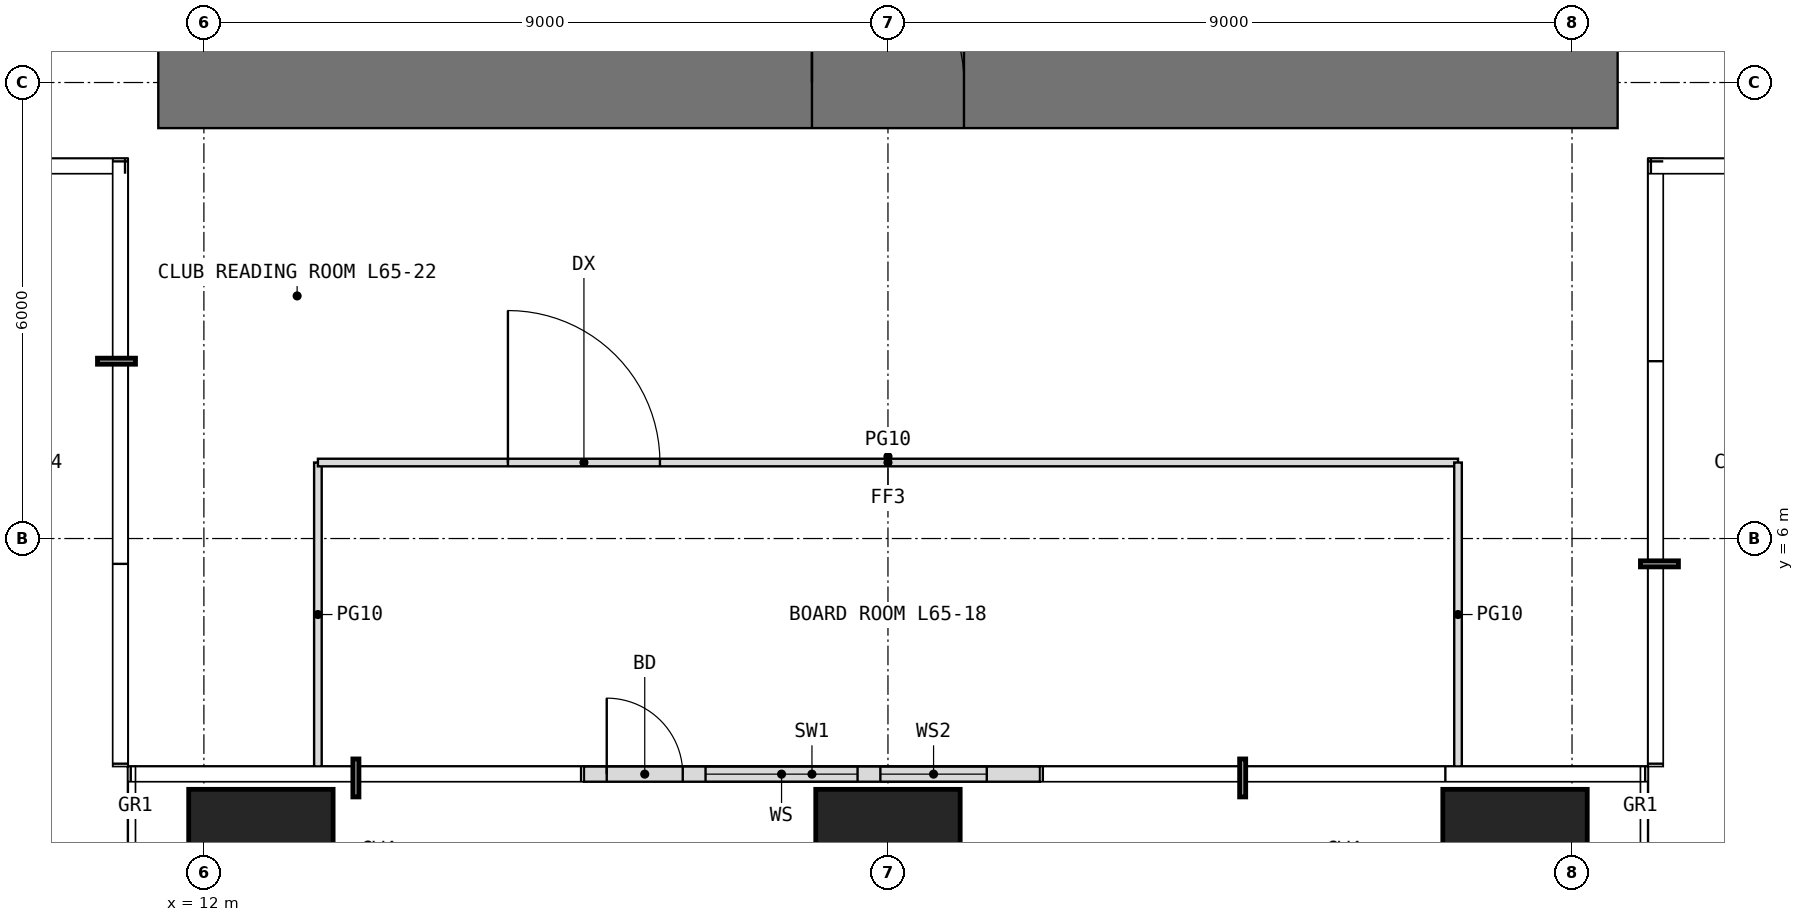
"""IFC4 building model, lengths in metres.
Left out: names, types, materials, properties, quantities, classifications, styles, units other than length and angle.
Written with IfcOpenShell. Run it as: python <this file> out.ifc"""

import sys

from ifc_helpers import new_model, si_unit, direction, frame, frame_2d, origin, origin_2d, place, context, subcontext, project, spatial, rectangle, extrude, element, fill, save


model = new_model("IFC4")
c1 = context("Model", 3, precision=1e-05, world=origin(), true_north=direction((0.0, 1.0)))
c2 = subcontext(c1, "Body", "Model", "MODEL_VIEW")
j1 = project(units=[si_unit("LENGTHUNIT", "METRE"), si_unit("PLANEANGLEUNIT", "RADIAN")], contexts=[c1])
p1 = place(None, origin())
s1 = spatial("IfcSite", under=j1, at=p1, CompositionType="ELEMENT")
p2 = place(p1, origin())
s2 = spatial("IfcBuilding", under=s1, at=p2, CompositionType="ELEMENT")
p3 = place(p2, frame((0.0, 0.0, 273.4)))
s3 = spatial("IfcBuildingStorey", under=s2, at=p3, CompositionType="ELEMENT", Elevation=273.4)
for number, where, z_axis, x_axis in (
    (1, (12.75, 1.75, 0.0), (0.0, 0.0, 1.0), (1.0, 0.0, 0.0)),
    (2, (21.0, 1.75, 0.0), (0.0, 0.0, 1.0), (1.0, 0.0, 0.0)),
    (3, (29.25, 1.75, 0.0), (0.0, 0.0, 1.0), (1.0, 0.0, 0.0)),
):
    element("IfcColumn", number, at=place(p3, frame(where, z_axis=z_axis, x_axis=x_axis)), inside=s3, PredefinedType="COLUMN", context=c2, shape_type="SweptSolid", body=[
        extrude(rectangle(XDim=1.9, YDim=1.9, at=origin_2d()), origin(), (0.0, 0.0, 1.0), 4.5),
    ])
p4 = place(p3, frame((17.0, 2.9, 0.0), z_axis=(0.0, 0.0, 1.0), x_axis=(1.0, 0.0, 0.0)))
e4 = element("IfcWall", 4, at=p4, inside=s3, PredefinedType="USERDEFINED", context=c2, shape_type="SweptSolid", body=[
    extrude(rectangle(XDim=6.0, YDim=0.2, at=frame_2d((3.0, 0.0))), origin(), (0.0, 0.0, 1.0), 4.2),
])
p5 = place(p4, frame((0.3, 0.0, 0.0)))
e5 = element("IfcOpeningElement", 5, at=p5, cuts=e4, PredefinedType="OPENING", context=c2, shape_type="SweptSolid", body=[
    extrude(rectangle(XDim=1.0, YDim=2.4, at=frame_2d((0.5, 1.2))), frame((0.0, 0.11, 0.0), z_axis=(0.0, -1.0, 0.0), x_axis=(1.0, 0.0, 0.0)), (0.0, 0.0, 1.0), 0.22),
])
p6 = place(p4, frame((1.6, 0.0, 0.3)))
e6 = element("IfcOpeningElement", 6, at=p6, cuts=e4, PredefinedType="OPENING", context=c2, shape_type="SweptSolid", body=[
    extrude(rectangle(XDim=2.0, YDim=2.7, at=frame_2d((1.0, 1.35))), frame((0.0, 0.11, 0.0), z_axis=(0.0, -1.0, 0.0), x_axis=(1.0, 0.0, 0.0)), (0.0, 0.0, 1.0), 0.22),
])
p7 = place(p4, frame((3.9, 0.0, 0.3)))
e7 = element("IfcOpeningElement", 7, at=p7, cuts=e4, PredefinedType="OPENING", context=c2, shape_type="SweptSolid", body=[
    extrude(rectangle(XDim=1.4, YDim=2.7, at=frame_2d((0.7, 1.35))), frame((0.0, 0.11, 0.0), z_axis=(0.0, -1.0, 0.0), x_axis=(1.0, 0.0, 0.0)), (0.0, 0.0, 1.0), 0.22),
])
p8 = place(p3, frame((11.4, 12.0, -0.05), z_axis=(0.0, 0.0, 1.0), x_axis=(1.0, 0.0, 0.0)))
e8 = element("IfcWall", 8, at=p8, inside=s3, PredefinedType="SHEAR", context=c2, shape_type="SweptSolid", body=[
    extrude(rectangle(XDim=19.2, YDim=1.2, at=frame_2d((9.6, 0.0))), origin(), (0.0, 0.0, 1.0), 4.45),
])
p9 = place(p8, frame((8.6, 0.0, 0.05)))
e9 = element("IfcOpeningElement", 9, at=p9, cuts=e8, PredefinedType="OPENING", context=c2, shape_type="SweptSolid", body=[
    extrude(rectangle(XDim=2.0, YDim=2.2, at=frame_2d((1.0, 1.1))), frame((0.0, 0.61, 0.0), z_axis=(0.0, -1.0, 0.0), x_axis=(1.0, 0.0, 0.0)), (0.0, 0.0, 1.0), 1.22),
])
p10 = place(p3, frame((13.5, 3.0, 0.0), z_axis=(0.0, 0.0, 1.0), x_axis=(0.0, 1.0, 0.0)))
e10 = element("IfcWall", 10, at=p10, inside=s3, PredefinedType="PARTITIONING", context=c2, shape_type="SweptSolid", body=[
    extrude(rectangle(XDim=4.0, YDim=0.1, at=frame_2d((2.0, 0.0))), origin(), (0.0, 0.0, 1.0), 4.2),
])
p11 = place(p3, frame((13.5, 7.0, 0.0), z_axis=(0.0, 0.0, 1.0), x_axis=(1.0, 0.0, 0.0)))
e11 = element("IfcWall", 11, at=p11, inside=s3, PredefinedType="PARTITIONING", context=c2, shape_type="SweptSolid", body=[
    extrude(rectangle(XDim=15.0, YDim=0.1, at=frame_2d((7.5, 0.0))), origin(), (0.0, 0.0, 1.0), 4.2),
])
p12 = place(p11, frame((2.5, 0.0, 0.0)))
e12 = element("IfcOpeningElement", 12, at=p12, cuts=e11, PredefinedType="OPENING", context=c2, shape_type="SweptSolid", body=[
    extrude(rectangle(XDim=2.0, YDim=2.4, at=frame_2d((1.0, 1.2))), frame((0.0, 0.06, 0.0), z_axis=(0.0, -1.0, 0.0), x_axis=(1.0, 0.0, 0.0)), (0.0, 0.0, 1.0), 0.12),
])
p13 = place(p3, frame((28.5, 3.0, 0.0), z_axis=(0.0, 0.0, 1.0), x_axis=(0.0, 1.0, 0.0)))
e13 = element("IfcWall", 13, at=p13, inside=s3, PredefinedType="PARTITIONING", context=c2, shape_type="SweptSolid", body=[
    extrude(rectangle(XDim=4.0, YDim=0.1, at=frame_2d((2.0, 0.0))), origin(), (0.0, 0.0, 1.0), 4.2),
])
p14 = place(p5, origin())
e14 = element("IfcDoor", 14, at=p14, inside=s3, OperationType="SINGLE_SWING_LEFT", PredefinedType="DOOR", context=c2, shape_type="SweptSolid", body=[
    extrude(rectangle(XDim=1.0, YDim=2.4, at=frame_2d((0.5, 1.2))), frame((0.0, 0.025, 0.0), z_axis=(0.0, -1.0, 0.0), x_axis=(1.0, 0.0, 0.0)), (0.0, 0.0, 1.0), 0.05),
])
fill(e5, e14)
p15 = place(p6, origin())
e15 = element("IfcWindow", 15, at=p15, inside=s3, PartitioningType="SINGLE_PANEL", PredefinedType="WINDOW", context=c2, shape_type="SweptSolid", body=[
    extrude(rectangle(XDim=2.0, YDim=2.7, at=frame_2d((1.0, 1.35))), frame((0.0, 0.03, 0.0), z_axis=(0.0, -1.0, 0.0), x_axis=(1.0, 0.0, 0.0)), (0.0, 0.0, 1.0), 0.06),
])
fill(e6, e15)
p16 = place(p7, origin())
e16 = element("IfcWindow", 16, at=p16, inside=s3, PartitioningType="SINGLE_PANEL", PredefinedType="WINDOW", context=c2, shape_type="SweptSolid", body=[
    extrude(rectangle(XDim=1.4, YDim=2.7, at=frame_2d((0.7, 1.35))), frame((0.0, 0.03, 0.0), z_axis=(0.0, -1.0, 0.0), x_axis=(1.0, 0.0, 0.0)), (0.0, 0.0, 1.0), 0.06),
])
fill(e7, e16)
p17 = place(p9, origin())
e17 = element("IfcDoor", 17, at=p17, inside=s3, OperationType="DOUBLE_DOOR_SINGLE_SWING", PredefinedType="DOOR", context=c2, shape_type="SweptSolid", body=[
    extrude(rectangle(XDim=2.0, YDim=2.2, at=frame_2d((1.0, 1.1))), frame((0.0, 0.025, 0.0), z_axis=(0.0, -1.0, 0.0), x_axis=(1.0, 0.0, 0.0)), (0.0, 0.0, 1.0), 0.05),
])
fill(e9, e17)
p18 = place(p12, origin())
e18 = element("IfcDoor", 18, at=p18, inside=s3, OperationType="DOUBLE_DOOR_SINGLE_SWING", PredefinedType="DOOR", context=c2, shape_type="SweptSolid", body=[
    extrude(rectangle(XDim=2.0, YDim=2.4, at=frame_2d((1.0, 1.2))), frame((0.0, 0.025, 0.0), z_axis=(0.0, -1.0, 0.0), x_axis=(1.0, 0.0, 0.0)), (0.0, 0.0, 1.0), 0.05),
])
fill(e12, e18)
save(model, sys.argv[1])
